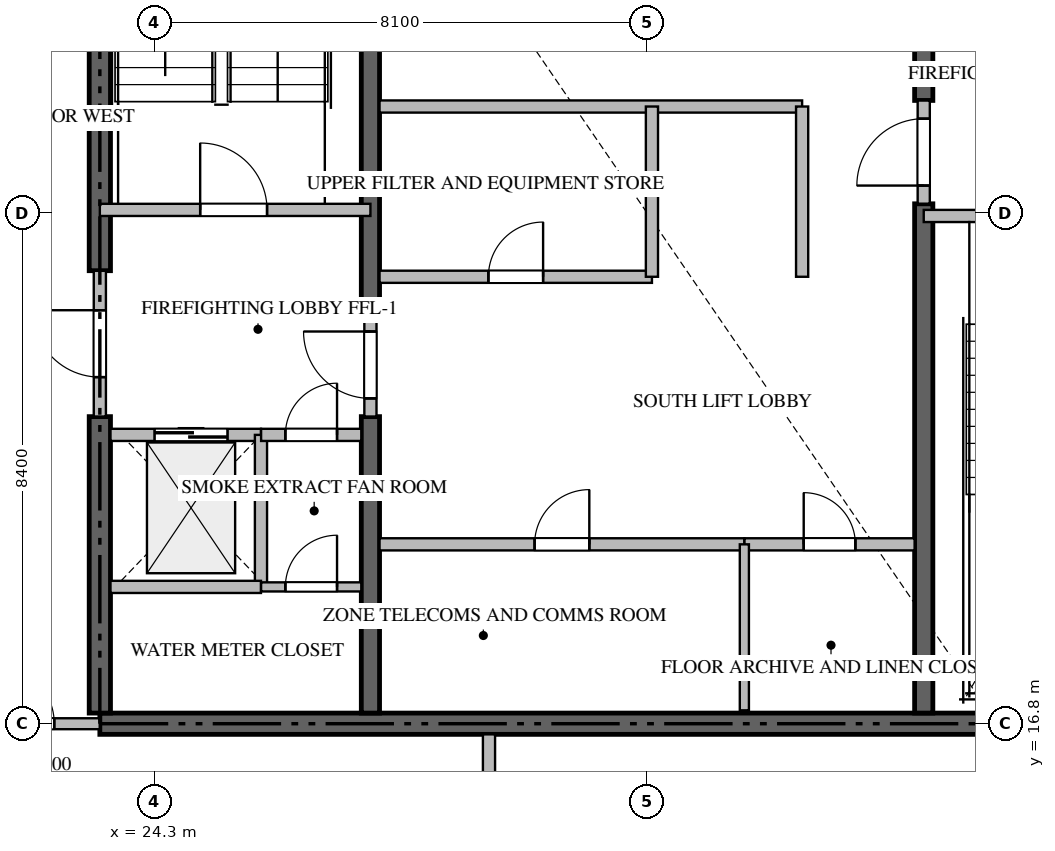
"""IFC4 building model, lengths in metres.
Left out: names, types, materials, properties, quantities, classifications, styles, units other than length and angle.
Written with IfcOpenShell. Run it as: python <this file> out.ifc"""

import sys

from ifc_helpers import new_model, si_unit, direction, frame, frame_2d, origin, place, context, subcontext, project, spatial, rectangle, extrude, source, transform, mapped, element, fill, save


model = new_model("IFC4")
c1 = context("Model", 3, precision=1e-05, world=origin(), true_north=direction((0.0, 1.0)))
c2 = subcontext(c1, "Body", "Model", "MODEL_VIEW")
j1 = project(units=[si_unit("LENGTHUNIT", "METRE"), si_unit("PLANEANGLEUNIT", "RADIAN")], contexts=[c1])
p1 = place(None, origin())
s1 = spatial("IfcSite", under=j1, at=p1, CompositionType="ELEMENT")
p2 = place(p1, origin())
s2 = spatial("IfcBuilding", under=s1, at=p2, CompositionType="ELEMENT")
p3 = place(p2, frame((0.0, 0.0, 293.45)))
s3 = spatial("IfcBuildingStorey", under=s2, at=p3, CompositionType="ELEMENT", Elevation=293.45)
p4 = place(p3, frame((23.4, 16.8, -0.26), z_axis=(0.0, 0.0, 1.0), x_axis=(1.0, 0.0, 0.0)))
e1 = element("IfcWall", 1, at=p4, inside=s3, PredefinedType="SHEAR", context=c2, shape_type="SweptSolid", body=[
    extrude(rectangle(XDim=18.0, YDim=0.35, at=frame_2d((9.0, 0.0))), origin(), (0.0, 0.0, 1.0), 4.048),
])
p5 = place(p3, frame((23.4, 16.975, -0.26), z_axis=(0.0, 0.0, 1.0), x_axis=(0.0, 1.0, 0.0)))
e2 = element("IfcWall", 2, at=p5, inside=s3, PredefinedType="SHEAR", context=c2, shape_type="SweptSolid", body=[
    extrude(rectangle(XDim=4.875, YDim=0.35, at=frame_2d((2.438, 0.0))), origin(), (0.0, 0.0, 1.0), 4.048),
])
p6 = place(p3, frame((23.4, 24.25, -0.26), z_axis=(0.0, 0.0, 1.0), x_axis=(0.0, 1.0, 0.0)))
e3 = element("IfcWall", 3, at=p6, inside=s3, PredefinedType="SHEAR", context=c2, shape_type="SweptSolid", body=[
    extrude(rectangle(XDim=9.175, YDim=0.35, at=frame_2d((4.587, 0.0))), origin(), (0.0, 0.0, 1.0), 4.048),
])
p7 = place(p3, frame((27.85, 16.975, -0.26), z_axis=(0.0, 0.0, 1.0), x_axis=(0.0, 1.0, 0.0)))
e4 = element("IfcWall", 4, at=p7, inside=s3, PredefinedType="SHEAR", context=c2, shape_type="SweptSolid", body=[
    extrude(rectangle(XDim=4.875, YDim=0.3, at=frame_2d((2.438, 0.0))), origin(), (0.0, 0.0, 1.0), 4.048),
])
p8 = place(p3, frame((27.85, 23.55, -0.26), z_axis=(0.0, 0.0, 1.0), x_axis=(0.0, 1.0, 0.0)))
e5 = element("IfcWall", 5, at=p8, inside=s3, PredefinedType="SHEAR", context=c2, shape_type="SweptSolid", body=[
    extrude(rectangle(XDim=9.875, YDim=0.3, at=frame_2d((4.938, 0.0))), origin(), (0.0, 0.0, 1.0), 4.048),
])
p9 = place(p3, frame((36.95, 16.975, -0.26), z_axis=(0.0, 0.0, 1.0), x_axis=(0.0, 1.0, 0.0)))
e6 = element("IfcWall", 6, at=p9, inside=s3, PredefinedType="SHEAR", context=c2, shape_type="SweptSolid", body=[
    extrude(rectangle(XDim=8.375, YDim=0.3, at=frame_2d((4.188, 0.0))), origin(), (0.0, 0.0, 1.0), 4.048),
])
p10 = place(p3, frame((36.95, 27.05, -0.26), z_axis=(0.0, 0.0, 1.0), x_axis=(0.0, 1.0, 0.0)))
e7 = element("IfcWall", 7, at=p10, inside=s3, PredefinedType="SHEAR", context=c2, shape_type="SweptSolid", body=[
    extrude(rectangle(XDim=6.375, YDim=0.3, at=frame_2d((3.188, 0.0))), origin(), (0.0, 0.0, 1.0), 4.048),
])
p11 = place(p3, frame((23.4, 25.25, 0.0), z_axis=(0.0, 0.0, 1.0), x_axis=(1.0, 0.0, 0.0)))
e8 = element("IfcWall", 8, at=p11, inside=s3, PredefinedType="STANDARD", context=c2, shape_type="SweptSolid", body=[
    extrude(rectangle(XDim=4.45, YDim=0.2, at=frame_2d((2.225, 0.0))), origin(), (0.0, 0.0, 1.0), 3.79),
])
p12 = place(p11, frame((1.65, 0.0, 0.0)))
e9 = element("IfcOpeningElement", 9, at=p12, cuts=e8, PredefinedType="OPENING", context=c2, shape_type="SweptSolid", body=[
    extrude(rectangle(XDim=1.1, YDim=2.15, at=frame_2d((0.55, 1.075))), frame((0.0, 0.11, 0.0), z_axis=(0.0, -1.0, 0.0), x_axis=(1.0, 0.0, 0.0)), (0.0, 0.0, 1.0), 0.22),
])
p13 = place(p3, frame((36.95, 25.15, 0.0), z_axis=(0.0, 0.0, 1.0), x_axis=(1.0, 0.0, 0.0)))
e10 = element("IfcWall", 10, at=p13, inside=s3, PredefinedType="STANDARD", context=c2, shape_type="SweptSolid", body=[
    extrude(rectangle(XDim=4.45, YDim=0.2, at=frame_2d((2.225, 0.0))), origin(), (0.0, 0.0, 1.0), 3.79),
])
p14 = place(p13, frame((1.65, 0.0, 0.0)))
e11 = element("IfcOpeningElement", 11, at=p14, cuts=e10, PredefinedType="OPENING", context=c2, shape_type="SweptSolid", body=[
    extrude(rectangle(XDim=1.1, YDim=2.15, at=frame_2d((0.55, 1.075))), frame((0.0, 0.11, 0.0), z_axis=(0.0, -1.0, 0.0), x_axis=(1.0, 0.0, 0.0)), (0.0, 0.0, 1.0), 0.22),
])
p15 = place(p3, frame((23.575, 21.55, 0.0), z_axis=(0.0, 0.0, 1.0), x_axis=(1.0, 0.0, 0.0)))
e12 = element("IfcWall", 12, at=p15, inside=s3, PredefinedType="STANDARD", context=c2, shape_type="SweptSolid", body=[
    extrude(rectangle(XDim=2.475, YDim=0.2, at=frame_2d((1.238, 0.0))), origin(), (0.0, 0.0, 1.0), 3.79),
])
p16 = place(p15, frame((0.725, 0.0, 0.0)))
e13 = element("IfcOpeningElement", 13, at=p16, cuts=e12, PredefinedType="OPENING", context=c2, shape_type="SweptSolid", body=[
    extrude(rectangle(XDim=1.2, YDim=2.2, at=frame_2d((0.6, 1.1))), frame((0.0, 0.11, 0.0), z_axis=(0.0, -1.0, 0.0), x_axis=(1.0, 0.0, 0.0)), (0.0, 0.0, 1.0), 0.22),
])
p17 = place(p3, frame((26.05, 19.05, 0.0), z_axis=(0.0, 0.0, 1.0), x_axis=(0.0, 1.0, 0.0)))
e14 = element("IfcWall", 14, at=p17, inside=s3, PredefinedType="STANDARD", context=c2, shape_type="SweptSolid", body=[
    extrude(rectangle(XDim=2.5, YDim=0.2, at=frame_2d((1.25, 0.0))), origin(), (0.0, 0.0, 1.0), 3.79),
])
p18 = place(p3, frame((23.575, 19.05, 0.0), z_axis=(0.0, 0.0, 1.0), x_axis=(1.0, 0.0, 0.0)))
e15 = element("IfcWall", 15, at=p18, inside=s3, PredefinedType="STANDARD", context=c2, shape_type="SweptSolid", body=[
    extrude(rectangle(XDim=2.475, YDim=0.2, at=frame_2d((1.238, 0.0))), origin(), (0.0, 0.0, 1.0), 3.79),
])
p19 = place(p3, frame((26.052, 21.55, 0.0), z_axis=(0.0, 0.0, 1.0), x_axis=(1.0, 0.0, 0.0)))
e16 = element("IfcWall", 16, at=p19, inside=s3, PredefinedType="STANDARD", context=c2, shape_type="SweptSolid", body=[
    extrude(rectangle(XDim=1.648, YDim=0.2, at=frame_2d((0.824, 0.0))), origin(), (0.0, 0.0, 1.0), 3.79),
])
p20 = place(p19, frame((0.399, 0.0, 0.0)))
e17 = element("IfcOpeningElement", 17, at=p20, cuts=e16, PredefinedType="OPENING", context=c2, shape_type="SweptSolid", body=[
    extrude(rectangle(XDim=0.85, YDim=2.1, at=frame_2d((0.425, 1.05))), frame((0.0, 0.11, 0.0), z_axis=(0.0, -1.0, 0.0), x_axis=(1.0, 0.0, 0.0)), (0.0, 0.0, 1.0), 0.22),
])
p21 = place(p3, frame((23.4, 21.852, 0.0), z_axis=(0.0, 0.0, 1.0), x_axis=(0.0, 1.0, 0.0)))
e18 = element("IfcWall", 18, at=p21, inside=s3, PredefinedType="STANDARD", context=c2, shape_type="SweptSolid", body=[
    extrude(rectangle(XDim=2.396, YDim=0.2, at=frame_2d((1.198, 0.0))), origin(), (0.0, 0.0, 1.0), 3.79),
])
p22 = place(p21, frame((0.648, 0.0, 0.0)))
e19 = element("IfcOpeningElement", 19, at=p22, cuts=e18, PredefinedType="OPENING", context=c2, shape_type="SweptSolid", body=[
    extrude(rectangle(XDim=1.1, YDim=2.15, at=frame_2d((0.55, 1.075))), frame((0.0, 0.11, 0.0), z_axis=(0.0, -1.0, 0.0), x_axis=(1.0, 0.0, 0.0)), (0.0, 0.0, 1.0), 0.22),
])
p23 = place(p3, frame((27.85, 21.852, 0.0), z_axis=(0.0, 0.0, 1.0), x_axis=(0.0, 1.0, 0.0)))
e20 = element("IfcWall", 20, at=p23, inside=s3, PredefinedType="STANDARD", context=c2, shape_type="SweptSolid", body=[
    extrude(rectangle(XDim=1.696, YDim=0.2, at=frame_2d((0.848, 0.0))), origin(), (0.0, 0.0, 1.0), 3.79),
])
p24 = place(p23, frame((0.298, 0.0, 0.0)))
e21 = element("IfcOpeningElement", 21, at=p24, cuts=e20, PredefinedType="OPENING", context=c2, shape_type="SweptSolid", body=[
    extrude(rectangle(XDim=1.1, YDim=2.15, at=frame_2d((0.55, 1.075))), frame((0.0, 0.11, 0.0), z_axis=(0.0, -1.0, 0.0), x_axis=(1.0, 0.0, 0.0)), (0.0, 0.0, 1.0), 0.22),
])
p25 = place(p3, frame((36.95, 25.352, 0.0), z_axis=(0.0, 0.0, 1.0), x_axis=(0.0, 1.0, 0.0)))
e22 = element("IfcWall", 22, at=p25, inside=s3, PredefinedType="STANDARD", context=c2, shape_type="SweptSolid", body=[
    extrude(rectangle(XDim=1.696, YDim=0.2, at=frame_2d((0.848, 0.0))), origin(), (0.0, 0.0, 1.0), 3.79),
])
p26 = place(p25, frame((0.298, 0.0, 0.0)))
e23 = element("IfcOpeningElement", 23, at=p26, cuts=e22, PredefinedType="OPENING", context=c2, shape_type="SweptSolid", body=[
    extrude(rectangle(XDim=1.1, YDim=2.15, at=frame_2d((0.55, 1.075))), frame((0.0, 0.11, 0.0), z_axis=(0.0, -1.0, 0.0), x_axis=(1.0, 0.0, 0.0)), (0.0, 0.0, 1.0), 0.22),
])
p27 = place(p3, frame((26.052, 19.05, 0.0), z_axis=(0.0, 0.0, 1.0), x_axis=(1.0, 0.0, 0.0)))
e24 = element("IfcWall", 24, at=p27, inside=s3, PredefinedType="PARTITIONING", context=c2, shape_type="SweptSolid", body=[
    extrude(rectangle(XDim=1.648, YDim=0.15, at=frame_2d((0.824, 0.0))), origin(), (0.0, 0.0, 1.0), 3.79),
])
p28 = place(p27, frame((0.399, 0.0, 0.0)))
e25 = element("IfcOpeningElement", 25, at=p28, cuts=e24, PredefinedType="OPENING", context=c2, shape_type="SweptSolid", body=[
    extrude(rectangle(XDim=0.85, YDim=2.1, at=frame_2d((0.425, 1.05))), frame((0.0, 0.085, 0.0), z_axis=(0.0, -1.0, 0.0), x_axis=(1.0, 0.0, 0.0)), (0.0, 0.0, 1.0), 0.17),
])
p29 = place(p3, frame((28.0, 19.75, 0.0), z_axis=(0.0, 0.0, 1.0), x_axis=(1.0, 0.0, 0.0)))
e26 = element("IfcWall", 26, at=p29, inside=s3, PredefinedType="STANDARD", context=c2, shape_type="SweptSolid", body=[
    extrude(rectangle(XDim=6.0, YDim=0.2, at=frame_2d((3.0, 0.0))), origin(), (0.0, 0.0, 1.0), 3.79),
])
p30 = place(p29, frame((2.55, 0.0, 0.0)))
e27 = element("IfcOpeningElement", 27, at=p30, cuts=e26, PredefinedType="OPENING", context=c2, shape_type="SweptSolid", body=[
    extrude(rectangle(XDim=0.9, YDim=2.1, at=frame_2d((0.45, 1.05))), frame((0.0, 0.11, 0.0), z_axis=(0.0, -1.0, 0.0), x_axis=(1.0, 0.0, 0.0)), (0.0, 0.0, 1.0), 0.22),
])
p31 = place(p3, frame((34.002, 19.75, 0.0), z_axis=(0.0, 0.0, 1.0), x_axis=(1.0, 0.0, 0.0)))
e28 = element("IfcWall", 28, at=p31, inside=s3, PredefinedType="STANDARD", context=c2, shape_type="SweptSolid", body=[
    extrude(rectangle(XDim=2.798, YDim=0.2, at=frame_2d((1.399, 0.0))), origin(), (0.0, 0.0, 1.0), 3.79),
])
p32 = place(p31, frame((0.974, 0.0, 0.0)))
e29 = element("IfcOpeningElement", 29, at=p32, cuts=e28, PredefinedType="OPENING", context=c2, shape_type="SweptSolid", body=[
    extrude(rectangle(XDim=0.85, YDim=2.1, at=frame_2d((0.425, 1.05))), frame((0.0, 0.11, 0.0), z_axis=(0.0, -1.0, 0.0), x_axis=(1.0, 0.0, 0.0)), (0.0, 0.0, 1.0), 0.22),
])
p33 = place(p3, frame((34.0, 17.02, 0.0), z_axis=(0.0, 0.0, 1.0), x_axis=(0.0, 1.0, 0.0)))
e30 = element("IfcWall", 30, at=p33, inside=s3, PredefinedType="PARTITIONING", context=c2, shape_type="SweptSolid", body=[
    extrude(rectangle(XDim=2.73, YDim=0.15, at=frame_2d((1.365, 0.0))), origin(), (0.0, 0.0, 1.0), 3.79),
])
p34 = place(p3, frame((28.0, 26.95, 0.0), z_axis=(0.0, 0.0, 1.0), x_axis=(1.0, 0.0, 0.0)))
e31 = element("IfcWall", 31, at=p34, inside=s3, PredefinedType="STANDARD", context=c2, shape_type="SweptSolid", body=[
    extrude(rectangle(XDim=6.95, YDim=0.2, at=frame_2d((3.475, 0.0))), origin(), (0.0, 0.0, 1.0), 3.79),
])
p35 = place(p3, frame((34.95, 24.15, 0.0), z_axis=(0.0, 0.0, 1.0), x_axis=(0.0, 1.0, 0.0)))
e32 = element("IfcWall", 32, at=p35, inside=s3, PredefinedType="STANDARD", context=c2, shape_type="SweptSolid", body=[
    extrude(rectangle(XDim=2.8, YDim=0.2, at=frame_2d((1.4, 0.0))), origin(), (0.0, 0.0, 1.0), 3.79),
])
p36 = place(p3, frame((28.0, 24.15, 0.0), z_axis=(0.0, 0.0, 1.0), x_axis=(1.0, 0.0, 0.0)))
e33 = element("IfcWall", 33, at=p36, inside=s3, PredefinedType="STANDARD", context=c2, shape_type="SweptSolid", body=[
    extrude(rectangle(XDim=4.48, YDim=0.2, at=frame_2d((2.24, 0.0))), origin(), (0.0, 0.0, 1.0), 3.79),
])
p37 = place(p36, frame((1.79, 0.0, 0.0)))
e34 = element("IfcOpeningElement", 34, at=p37, cuts=e33, PredefinedType="OPENING", context=c2, shape_type="SweptSolid", body=[
    extrude(rectangle(XDim=0.9, YDim=2.1, at=frame_2d((0.45, 1.05))), frame((0.0, 0.11, 0.0), z_axis=(0.0, -1.0, 0.0), x_axis=(1.0, 0.0, 0.0)), (0.0, 0.0, 1.0), 0.22),
])
p38 = place(p3, frame((32.48, 24.15, 0.0), z_axis=(0.0, 0.0, 1.0), x_axis=(0.0, 1.0, 0.0)))
e35 = element("IfcWall", 35, at=p38, inside=s3, PredefinedType="STANDARD", context=c2, shape_type="SweptSolid", body=[
    extrude(rectangle(XDim=2.8, YDim=0.2, at=frame_2d((1.4, 0.0))), origin(), (0.0, 0.0, 1.0), 3.79),
])
p39 = place(p3, frame((29.8, 2.482, 0.0), z_axis=(0.0, 0.0, 1.0), x_axis=(0.0, 1.0, 0.0)))
e36 = element("IfcWall", 36, at=p39, inside=s3, PredefinedType="PARTITIONING", context=c2, shape_type="SweptSolid", body=[
    extrude(rectangle(XDim=14.143, YDim=0.2, at=frame_2d((7.072, 0.0))), origin(), (0.0, 0.0, 1.0), 3.79),
])
p40 = place(p3, frame((20.902, 16.8, 0.0), z_axis=(0.0, 0.0, 1.0), x_axis=(1.0, 0.0, 0.0)))
e37 = element("IfcWall", 37, at=p40, inside=s3, PredefinedType="PARTITIONING", context=c2, shape_type="SweptSolid", body=[
    extrude(rectangle(XDim=2.496, YDim=0.18, at=frame_2d((1.248, 0.0))), origin(), (0.0, 0.0, 1.0), 3.79),
])
p41 = place(p40, frame((0.748, 0.0, 0.0)))
e38 = element("IfcOpeningElement", 38, at=p41, cuts=e37, PredefinedType="OPENING", context=c2, shape_type="SweptSolid", body=[
    extrude(rectangle(XDim=1.0, YDim=2.15, at=frame_2d((0.5, 1.075))), frame((0.0, 0.1, 0.0), z_axis=(0.0, -1.0, 0.0), x_axis=(1.0, 0.0, 0.0)), (0.0, 0.0, 1.0), 0.2),
])
m1 = source(origin(), c2, "Body", "SweptSolid", [
    extrude(rectangle(XDim=1.1, YDim=2.15, at=frame_2d((0.55, 1.075))), frame((0.0, 0.025, 0.0), z_axis=(0.0, -1.0, 0.0), x_axis=(1.0, 0.0, 0.0)), (0.0, 0.0, 1.0), 0.05),
])
p42 = place(p12, origin())
e39 = element("IfcDoor", 39, at=p42, inside=s3, OperationType="SINGLE_SWING_LEFT", PredefinedType="DOOR", context=c2, shape_type="MappedRepresentation", body=[
    mapped(m1, transform((0.0, 0.0, 0.0), scale=1.0)),
])
fill(e9, e39)
m2 = source(origin(), c2, "Body", "SweptSolid", [
    extrude(rectangle(XDim=1.2, YDim=2.2, at=frame_2d((0.6, 1.1))), frame((0.0, 0.025, 0.0), z_axis=(0.0, -1.0, 0.0), x_axis=(1.0, 0.0, 0.0)), (0.0, 0.0, 1.0), 0.05),
])
p43 = place(p16, origin())
e40 = element("IfcDoor", 40, at=p43, inside=s3, OperationType="DOUBLE_DOOR_SLIDING", PredefinedType="DOOR", context=c2, shape_type="MappedRepresentation", body=[
    mapped(m2, transform((0.0, 0.0, 0.0), scale=1.0)),
])
fill(e13, e40)
m3 = source(origin(), c2, "Body", "SweptSolid", [
    extrude(rectangle(XDim=0.85, YDim=2.1, at=frame_2d((0.425, 1.05))), frame((0.0, 0.025, 0.0), z_axis=(0.0, -1.0, 0.0), x_axis=(1.0, 0.0, 0.0)), (0.0, 0.0, 1.0), 0.05),
])
p44 = place(p20, origin())
e41 = element("IfcDoor", 41, at=p44, inside=s3, OperationType="SINGLE_SWING_RIGHT", PredefinedType="DOOR", context=c2, shape_type="MappedRepresentation", body=[
    mapped(m3, transform((0.0, 0.0, 0.0), scale=1.0)),
])
fill(e17, e41)
p45 = place(p22, origin())
e42 = element("IfcDoor", 42, at=p45, inside=s3, OperationType="SINGLE_SWING_RIGHT", PredefinedType="DOOR", context=c2, shape_type="MappedRepresentation", body=[
    mapped(m1, transform((0.0, 0.0, 0.0), scale=1.0)),
])
fill(e19, e42)
p46 = place(p24, origin())
e43 = element("IfcDoor", 43, at=p46, inside=s3, OperationType="SINGLE_SWING_RIGHT", PredefinedType="DOOR", context=c2, shape_type="MappedRepresentation", body=[
    mapped(m1, transform((0.0, 0.0, 0.0), scale=1.0)),
])
fill(e21, e43)
p47 = place(p26, origin())
e44 = element("IfcDoor", 44, at=p47, inside=s3, OperationType="SINGLE_SWING_LEFT", PredefinedType="DOOR", context=c2, shape_type="MappedRepresentation", body=[
    mapped(m1, transform((0.0, 0.0, 0.0), scale=1.0)),
])
fill(e23, e44)
p48 = place(p28, origin())
e45 = element("IfcDoor", 45, at=p48, inside=s3, OperationType="SINGLE_SWING_RIGHT", PredefinedType="DOOR", context=c2, shape_type="MappedRepresentation", body=[
    mapped(m3, transform((0.0, 0.0, 0.0), scale=1.0)),
])
fill(e25, e45)
m4 = source(origin(), c2, "Body", "SweptSolid", [
    extrude(rectangle(XDim=0.9, YDim=2.1, at=frame_2d((0.45, 1.05))), frame((0.0, 0.025, 0.0), z_axis=(0.0, -1.0, 0.0), x_axis=(1.0, 0.0, 0.0)), (0.0, 0.0, 1.0), 0.05),
])
p49 = place(p30, origin())
e46 = element("IfcDoor", 46, at=p49, inside=s3, OperationType="SINGLE_SWING_RIGHT", PredefinedType="DOOR", context=c2, shape_type="MappedRepresentation", body=[
    mapped(m4, transform((0.0, 0.0, 0.0), scale=1.0)),
])
fill(e27, e46)
p50 = place(p32, origin())
e47 = element("IfcDoor", 47, at=p50, inside=s3, OperationType="SINGLE_SWING_LEFT", PredefinedType="DOOR", context=c2, shape_type="MappedRepresentation", body=[
    mapped(m3, transform((0.0, 0.0, 0.0), scale=1.0)),
])
fill(e29, e47)
p51 = place(p37, origin())
e48 = element("IfcDoor", 48, at=p51, inside=s3, OperationType="SINGLE_SWING_RIGHT", PredefinedType="DOOR", context=c2, shape_type="MappedRepresentation", body=[
    mapped(m4, transform((0.0, 0.0, 0.0), scale=1.0)),
])
fill(e34, e48)
m5 = source(origin(), c2, "Body", "SweptSolid", [
    extrude(rectangle(XDim=1.0, YDim=2.15, at=frame_2d((0.5, 1.075))), frame((0.0, 0.025, 0.0), z_axis=(0.0, -1.0, 0.0), x_axis=(1.0, 0.0, 0.0)), (0.0, 0.0, 1.0), 0.05),
])
p52 = place(p41, origin())
e49 = element("IfcDoor", 49, at=p52, inside=s3, OperationType="SINGLE_SWING_LEFT", PredefinedType="DOOR", context=c2, shape_type="MappedRepresentation", body=[
    mapped(m5, transform((0.0, 0.0, 0.0), scale=1.0)),
])
fill(e38, e49)
save(model, sys.argv[1])
